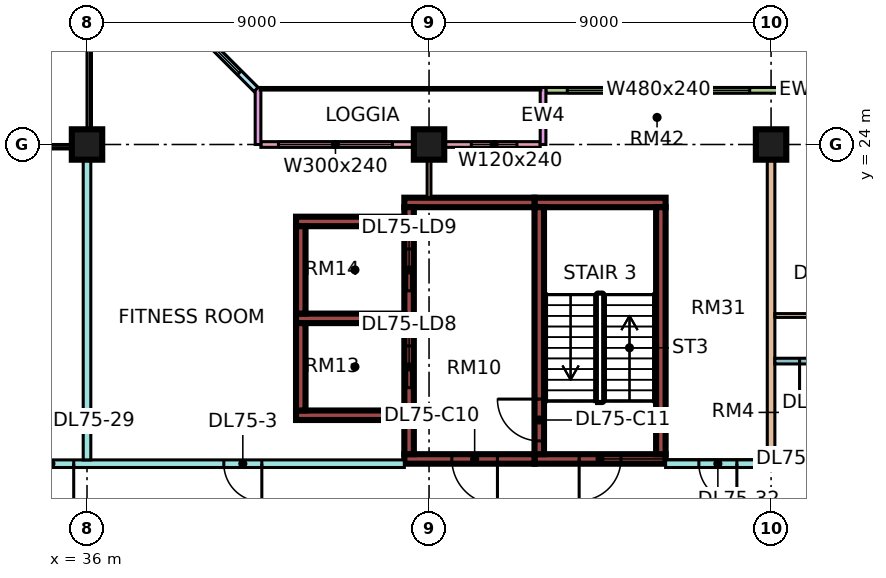
"""IFC4 building model, lengths in metres.
Left out: names, types, materials, properties, quantities, classifications, styles, units other than length and angle.
Written with IfcOpenShell. Run it as: python <this file> out.ifc"""

import sys

from ifc_helpers import new_model, si_unit, direction, frame, frame_2d, origin, origin_2d, place, context, subcontext, project, spatial, rectangle, extrude, element, fill, save


model = new_model("IFC4")
c1 = context("Model", 3, precision=1e-05, world=origin(), true_north=direction((0.0, 1.0)))
c2 = subcontext(c1, "Body", "Model", "MODEL_VIEW")
j1 = project(units=[si_unit("LENGTHUNIT", "METRE"), si_unit("PLANEANGLEUNIT", "RADIAN")], contexts=[c1])
p1 = place(None, origin())
s1 = spatial("IfcSite", under=j1, at=p1, CompositionType="ELEMENT")
p2 = place(p1, origin())
s2 = spatial("IfcBuilding", under=s1, at=p2, CompositionType="ELEMENT")
p3 = place(p2, frame((0.0, 0.0, 318.4)))
s3 = spatial("IfcBuildingStorey", under=s2, at=p3, CompositionType="ELEMENT", Elevation=318.4)
for number, where, z_axis, x_axis in (
    (1, (36.0, 24.0, 0.0), (0.0, 0.0, 1.0), (1.0, 0.0, 0.0)),
    (2, (45.0, 24.0, 0.0), (0.0, 0.0, 1.0), (1.0, 0.0, 0.0)),
    (3, (54.0, 24.0, 0.0), (0.0, 0.0, 1.0), (1.0, 0.0, 0.0)),
):
    element("IfcColumn", number, at=place(p3, frame(where, z_axis=z_axis, x_axis=x_axis)), inside=s3, PredefinedType="COLUMN", context=c2, shape_type="SweptSolid", body=[
        extrude(rectangle(XDim=0.8, YDim=0.8, at=origin_2d()), origin(), (0.0, 0.0, 1.0), 3.75),
    ])
p4 = place(p3, frame((47.775, 15.725, 0.0), z_axis=(0.0, 0.0, 1.0), x_axis=(1.0, 0.0, 0.0)))
e4 = element("IfcWall", 4, at=p4, inside=s3, PredefinedType="SHEAR", context=c2, shape_type="SweptSolid", body=[
    extrude(rectangle(XDim=3.45, YDim=0.25, at=frame_2d((1.725, 0.0))), origin(), (0.0, 0.0, 1.0), 3.75),
])
p5 = place(p4, frame((1.175, 0.0, 0.0)))
e5 = element("IfcOpeningElement", 5, at=p5, cuts=e4, PredefinedType="OPENING", context=c2, shape_type="SweptSolid", body=[
    extrude(rectangle(XDim=1.1, YDim=2.2, at=frame_2d((0.55, 1.1))), frame((0.0, 0.135, 0.0), z_axis=(0.0, -1.0, 0.0), x_axis=(1.0, 0.0, 0.0)), (0.0, 0.0, 1.0), 0.27),
])
p6 = place(p3, frame((47.775, 22.475, 0.0), z_axis=(0.0, 0.0, 1.0), x_axis=(1.0, 0.0, 0.0)))
e6 = element("IfcWall", 6, at=p6, inside=s3, PredefinedType="SHEAR", context=c2, shape_type="SweptSolid", body=[
    extrude(rectangle(XDim=3.45, YDim=0.25, at=frame_2d((1.725, 0.0))), origin(), (0.0, 0.0, 1.0), 3.75),
])
p7 = place(p3, frame((47.9, 15.85, 0.0), z_axis=(0.0, 0.0, 1.0), x_axis=(0.0, 1.0, 0.0)))
e7 = element("IfcWall", 7, at=p7, inside=s3, PredefinedType="SHEAR", context=c2, shape_type="SweptSolid", body=[
    extrude(rectangle(XDim=6.5, YDim=0.25, at=frame_2d((3.25, 0.0))), origin(), (0.0, 0.0, 1.0), 3.75),
])
p8 = place(p7, frame((0.35, 0.0, 0.0)))
e8 = element("IfcOpeningElement", 8, at=p8, cuts=e7, PredefinedType="OPENING", context=c2, shape_type="SweptSolid", body=[
    extrude(rectangle(XDim=1.1, YDim=2.2, at=frame_2d((0.55, 1.1))), frame((0.0, 0.135, 0.0), z_axis=(0.0, -1.0, 0.0), x_axis=(1.0, 0.0, 0.0)), (0.0, 0.0, 1.0), 0.27),
])
p9 = place(p3, frame((51.1, 15.85, 0.0), z_axis=(0.0, 0.0, 1.0), x_axis=(0.0, 1.0, 0.0)))
e9 = element("IfcWall", 9, at=p9, inside=s3, PredefinedType="SHEAR", context=c2, shape_type="SweptSolid", body=[
    extrude(rectangle(XDim=6.5, YDim=0.25, at=frame_2d((3.25, 0.0))), origin(), (0.0, 0.0, 1.0), 3.75),
])
p10 = place(p3, frame((44.35, 15.725, 0.0), z_axis=(0.0, 0.0, 1.0), x_axis=(1.0, 0.0, 0.0)))
e10 = element("IfcWall", 10, at=p10, inside=s3, PredefinedType="SHEAR", context=c2, shape_type="SweptSolid", body=[
    extrude(rectangle(XDim=3.425, YDim=0.25, at=frame_2d((1.712, 0.0))), origin(), (0.0, 0.0, 1.0), 3.75),
])
p11 = place(p10, frame((1.25, 0.0, 0.0)))
e11 = element("IfcOpeningElement", 11, at=p11, cuts=e10, PredefinedType="OPENING", context=c2, shape_type="SweptSolid", body=[
    extrude(rectangle(XDim=1.2, YDim=2.2, at=frame_2d((0.6, 1.1))), frame((0.0, 0.135, 0.0), z_axis=(0.0, -1.0, 0.0), x_axis=(1.0, 0.0, 0.0)), (0.0, 0.0, 1.0), 0.27),
])
p12 = place(p3, frame((44.35, 22.475, 0.0), z_axis=(0.0, 0.0, 1.0), x_axis=(1.0, 0.0, 0.0)))
e12 = element("IfcWall", 12, at=p12, inside=s3, PredefinedType="SHEAR", context=c2, shape_type="SweptSolid", body=[
    extrude(rectangle(XDim=3.425, YDim=0.25, at=frame_2d((1.712, 0.0))), origin(), (0.0, 0.0, 1.0), 3.75),
])
p13 = place(p3, frame((44.475, 15.85, 0.0), z_axis=(0.0, 0.0, 1.0), x_axis=(0.0, 1.0, 0.0)))
e13 = element("IfcWall", 13, at=p13, inside=s3, PredefinedType="SHEAR", context=c2, shape_type="SweptSolid", body=[
    extrude(rectangle(XDim=6.5, YDim=0.25, at=frame_2d((3.25, 0.0))), origin(), (0.0, 0.0, 1.0), 3.75),
])
p14 = place(p13, frame((1.75, 0.0, 0.0)))
e14 = element("IfcOpeningElement", 14, at=p14, cuts=e13, PredefinedType="OPENING", context=c2, shape_type="SweptSolid", body=[
    extrude(rectangle(XDim=1.1, YDim=2.2, at=frame_2d((0.55, 1.1))), frame((0.0, 0.135, 0.0), z_axis=(0.0, -1.0, 0.0), x_axis=(1.0, 0.0, 0.0)), (0.0, 0.0, 1.0), 0.27),
])
p15 = place(p13, frame((4.3, 0.0, 0.0)))
e15 = element("IfcOpeningElement", 15, at=p15, cuts=e13, PredefinedType="OPENING", context=c2, shape_type="SweptSolid", body=[
    extrude(rectangle(XDim=1.1, YDim=2.2, at=frame_2d((0.55, 1.1))), frame((0.0, 0.135, 0.0), z_axis=(0.0, -1.0, 0.0), x_axis=(1.0, 0.0, 0.0)), (0.0, 0.0, 1.0), 0.27),
])
for number, where, z_axis, x_axis in (
    (16, (41.5, 16.875, 0.0), (0.0, 0.0, 1.0), (1.0, 0.0, 0.0)),
    (17, (41.5, 19.425, 0.0), (0.0, 0.0, 1.0), (1.0, 0.0, 0.0)),
    (18, (41.5, 21.975, 0.0), (0.0, 0.0, 1.0), (1.0, 0.0, 0.0)),
):
    element("IfcWall", number, at=place(p3, frame(where, z_axis=z_axis, x_axis=x_axis)), inside=s3, PredefinedType="SHEAR", context=c2, shape_type="SweptSolid", body=[
        extrude(rectangle(XDim=2.85, YDim=0.25, at=frame_2d((1.425, 0.0))), origin(), (0.0, 0.0, 1.0), 3.75),
    ])
for number, where, z_axis, x_axis in (
    (19, (41.625, 17.0, 0.0), (0.0, 0.0, 1.0), (0.0, 1.0, 0.0)),
    (20, (41.625, 19.55, 0.0), (0.0, 0.0, 1.0), (0.0, 1.0, 0.0)),
):
    element("IfcWall", number, at=place(p3, frame(where, z_axis=z_axis, x_axis=x_axis)), inside=s3, PredefinedType="SHEAR", context=c2, shape_type="SweptSolid", body=[
        extrude(rectangle(XDim=2.3, YDim=0.25, at=frame_2d((1.15, 0.0))), origin(), (0.0, 0.0, 1.0), 3.75),
    ])
p16 = place(p3, frame((61.5, 25.425, 0.0), z_axis=(0.0, 0.0, 1.0), x_axis=(-1.0, 0.0, 0.0)))
e21 = element("IfcWall", 21, at=p16, inside=s3, PredefinedType="SOLIDWALL", context=c2, shape_type="SweptSolid", body=[
    extrude(rectangle(XDim=13.425, YDim=0.15, at=frame_2d((6.712, 0.0))), origin(), (0.0, 0.0, 1.0), 3.3),
])
p17 = place(p16, frame((2.1, 0.0, 0.45)))
e22 = element("IfcOpeningElement", 22, at=p17, cuts=e21, PredefinedType="OPENING", context=c2, shape_type="SweptSolid", body=[
    extrude(rectangle(XDim=1.8, YDim=2.4, at=frame_2d((0.9, 1.2))), frame((0.0, 0.085, 0.0), z_axis=(0.0, -1.0, 0.0), x_axis=(1.0, 0.0, 0.0)), (0.0, 0.0, 1.0), 0.17),
])
p18 = place(p16, frame((5.1, 0.0, 0.45)))
e23 = element("IfcOpeningElement", 23, at=p18, cuts=e21, PredefinedType="OPENING", context=c2, shape_type="SweptSolid", body=[
    extrude(rectangle(XDim=1.8, YDim=2.4, at=frame_2d((0.9, 1.2))), frame((0.0, 0.085, 0.0), z_axis=(0.0, -1.0, 0.0), x_axis=(1.0, 0.0, 0.0)), (0.0, 0.0, 1.0), 0.17),
])
p19 = place(p16, frame((8.062, 0.0, 0.45)))
e24 = element("IfcOpeningElement", 24, at=p19, cuts=e21, PredefinedType="OPENING", context=c2, shape_type="SweptSolid", body=[
    extrude(rectangle(XDim=4.8, YDim=2.4, at=frame_2d((2.4, 1.2))), frame((0.0, 0.085, 0.0), z_axis=(0.0, -1.0, 0.0), x_axis=(1.0, 0.0, 0.0)), (0.0, 0.0, 1.0), 0.17),
])
p20 = place(p3, frame((47.925, 24.0, 0.0), z_axis=(0.0, 0.0, 1.0), x_axis=(-1.0, 0.0, 0.0)))
e25 = element("IfcWall", 25, at=p20, inside=s3, PredefinedType="SOLIDWALL", context=c2, shape_type="SweptSolid", body=[
    extrude(rectangle(XDim=7.35, YDim=0.15, at=frame_2d((3.675, 0.0))), origin(), (0.0, 0.0, 1.0), 3.3),
])
p21 = place(p20, frame((0.613, 0.0, 0.45)))
e26 = element("IfcOpeningElement", 26, at=p21, cuts=e25, PredefinedType="OPENING", context=c2, shape_type="SweptSolid", body=[
    extrude(rectangle(XDim=1.2, YDim=2.4, at=frame_2d((0.6, 1.2))), frame((0.0, 0.085, 0.0), z_axis=(0.0, -1.0, 0.0), x_axis=(1.0, 0.0, 0.0)), (0.0, 0.0, 1.0), 0.17),
])
p22 = place(p20, frame((3.887, 0.0, 0.45)))
e27 = element("IfcOpeningElement", 27, at=p22, cuts=e25, PredefinedType="OPENING", context=c2, shape_type="SweptSolid", body=[
    extrude(rectangle(XDim=3.0, YDim=2.4, at=frame_2d((1.5, 1.2))), frame((0.0, 0.085, 0.0), z_axis=(0.0, -1.0, 0.0), x_axis=(1.0, 0.0, 0.0)), (0.0, 0.0, 1.0), 0.17),
])
for number, where, z_axis, x_axis in (
    (28, (48.0, 25.5, 0.0), (0.0, 0.0, 1.0), (0.0, -1.0, 0.0)),
    (29, (40.5, 25.5, 0.0), (0.0, 0.0, 1.0), (0.0, -1.0, 0.0)),
):
    element("IfcWall", number, at=place(p3, frame(where, z_axis=z_axis, x_axis=x_axis)), inside=s3, PredefinedType="SOLIDWALL", context=c2, shape_type="SweptSolid", body=[
        extrude(rectangle(XDim=1.5, YDim=0.15, at=frame_2d((0.75, 0.0))), origin(), (0.0, 0.0, 1.0), 3.3),
    ])
p23 = place(p3, frame((40.447, 25.447, 0.0), z_axis=(0.0, 0.0, 1.0), x_axis=(-0.707106781187, 0.707106781187, 0.0)))
e30 = element("IfcWall", 30, at=p23, inside=s3, PredefinedType="SOLIDWALL", context=c2, shape_type="SweptSolid", body=[
    extrude(rectangle(XDim=4.243, YDim=0.15, at=frame_2d((2.121, 0.0))), origin(), (0.0, 0.0, 1.0), 3.3),
])
p24 = place(p23, frame((0.621, 0.0, 0.45)))
e31 = element("IfcOpeningElement", 31, at=p24, cuts=e30, PredefinedType="OPENING", context=c2, shape_type="SweptSolid", body=[
    extrude(rectangle(XDim=3.0, YDim=2.4, at=frame_2d((1.5, 1.2))), frame((0.0, 0.085, 0.0), z_axis=(0.0, -1.0, 0.0), x_axis=(1.0, 0.0, 0.0)), (0.0, 0.0, 1.0), 0.17),
])
p25 = place(p3, frame((34.0, 15.6, 0.0), z_axis=(0.0, 0.0, 1.0), x_axis=(1.0, 0.0, 0.0)))
e32 = element("IfcWall", 32, at=p25, inside=s3, PredefinedType="PARTITIONING", context=c2, shape_type="SweptSolid", body=[
    extrude(rectangle(XDim=10.35, YDim=0.2, at=frame_2d((5.175, 0.0))), origin(), (0.0, 0.0, 1.0), 3.3),
])
p26 = place(p25, frame((5.6, 0.0, 0.0)))
e33 = element("IfcOpeningElement", 33, at=p26, cuts=e32, PredefinedType="OPENING", context=c2, shape_type="SweptSolid", body=[
    extrude(rectangle(XDim=1.0, YDim=2.1, at=frame_2d((0.5, 1.05))), frame((0.0, 0.11, 0.0), z_axis=(0.0, -1.0, 0.0), x_axis=(1.0, 0.0, 0.0)), (0.0, 0.0, 1.0), 0.22),
])
p27 = place(p25, frame((0.45, 0.0, 0.0)))
e34 = element("IfcOpeningElement", 34, at=p27, cuts=e32, PredefinedType="OPENING", context=c2, shape_type="SweptSolid", body=[
    extrude(rectangle(XDim=1.2, YDim=2.1, at=frame_2d((0.6, 1.05))), frame((0.0, 0.11, 0.0), z_axis=(0.0, -1.0, 0.0), x_axis=(1.0, 0.0, 0.0)), (0.0, 0.0, 1.0), 0.22),
])
p28 = place(p3, frame((36.0, 15.7, 0.0), z_axis=(0.0, 0.0, 1.0), x_axis=(0.0, 1.0, 0.0)))
e35 = element("IfcWall", 35, at=p28, inside=s3, PredefinedType="PARTITIONING", context=c2, shape_type="SweptSolid", body=[
    extrude(rectangle(XDim=8.3, YDim=0.2, at=frame_2d((4.15, 0.0))), origin(), (0.0, 0.0, 1.0), 3.3),
])
p29 = place(p3, frame((45.0, 22.6, 0.0), z_axis=(0.0, 0.0, 1.0), x_axis=(0.0, 1.0, 0.0)))
e36 = element("IfcWall", 36, at=p29, inside=s3, PredefinedType="PARTITIONING", context=c2, shape_type="SweptSolid", body=[
    extrude(rectangle(XDim=1.326, YDim=0.1, at=frame_2d((0.663, 0.0))), origin(), (0.0, 0.0, 1.0), 3.3),
])
p30 = place(p3, frame((51.225, 15.6, 0.0), z_axis=(0.0, 0.0, 1.0), x_axis=(1.0, 0.0, 0.0)))
e37 = element("IfcWall", 37, at=p30, inside=s3, PredefinedType="PARTITIONING", context=c2, shape_type="SweptSolid", body=[
    extrude(rectangle(XDim=11.701, YDim=0.2, at=frame_2d((5.851, 0.0))), origin(), (0.0, 0.0, 1.0), 3.3),
])
p31 = place(p30, frame((9.725, 0.0, 0.0)))
e38 = element("IfcOpeningElement", 38, at=p31, cuts=e37, PredefinedType="OPENING", context=c2, shape_type="SweptSolid", body=[
    extrude(rectangle(XDim=1.0, YDim=2.1, at=frame_2d((0.5, 1.05))), frame((0.0, 0.11, 0.0), z_axis=(0.0, -1.0, 0.0), x_axis=(1.0, 0.0, 0.0)), (0.0, 0.0, 1.0), 0.22),
])
p32 = place(p30, frame((0.875, 0.0, 0.0)))
e39 = element("IfcOpeningElement", 39, at=p32, cuts=e37, PredefinedType="OPENING", context=c2, shape_type="SweptSolid", body=[
    extrude(rectangle(XDim=1.0, YDim=2.1, at=frame_2d((0.5, 1.05))), frame((0.0, 0.11, 0.0), z_axis=(0.0, -1.0, 0.0), x_axis=(1.0, 0.0, 0.0)), (0.0, 0.0, 1.0), 0.22),
])
p33 = place(p3, frame((54.0, 15.7, 0.0), z_axis=(0.0, 0.0, 1.0), x_axis=(0.0, 1.0, 0.0)))
e40 = element("IfcWall", 40, at=p33, inside=s3, PredefinedType="PARTITIONING", context=c2, shape_type="SweptSolid", body=[
    extrude(rectangle(XDim=8.3, YDim=0.2, at=frame_2d((4.15, 0.0))), origin(), (0.0, 0.0, 1.0), 3.3),
])
p34 = place(p3, frame((54.1, 18.3, 0.0), z_axis=(0.0, 0.0, 1.0), x_axis=(1.0, 0.0, 0.0)))
e41 = element("IfcWall", 41, at=p34, inside=s3, PredefinedType="PARTITIONING", context=c2, shape_type="SweptSolid", body=[
    extrude(rectangle(XDim=5.975, YDim=0.15, at=frame_2d((2.987, 0.0))), origin(), (0.0, 0.0, 1.0), 3.3),
])
p35 = place(p34, frame((0.65, 0.0, 0.0)))
e42 = element("IfcOpeningElement", 42, at=p35, cuts=e41, PredefinedType="OPENING", context=c2, shape_type="SweptSolid", body=[
    extrude(rectangle(XDim=0.9, YDim=2.1, at=frame_2d((0.45, 1.05))), frame((0.0, 0.085, 0.0), z_axis=(0.0, -1.0, 0.0), x_axis=(1.0, 0.0, 0.0)), (0.0, 0.0, 1.0), 0.17),
])
p36 = place(p3, frame((54.1, 19.5, 0.0), z_axis=(0.0, 0.0, 1.0), x_axis=(1.0, 0.0, 0.0)))
e43 = element("IfcWall", 43, at=p36, inside=s3, PredefinedType="PARTITIONING", context=c2, shape_type="SweptSolid", body=[
    extrude(rectangle(XDim=5.95, YDim=0.1, at=frame_2d((2.975, 0.0))), origin(), (0.0, 0.0, 1.0), 3.3),
])
p37 = place(p36, frame((0.95, 0.0, 0.0)))
e44 = element("IfcOpeningElement", 44, at=p37, cuts=e43, PredefinedType="OPENING", context=c2, shape_type="SweptSolid", body=[
    extrude(rectangle(XDim=0.9, YDim=2.1, at=frame_2d((0.45, 1.05))), frame((0.0, 0.06, 0.0), z_axis=(0.0, -1.0, 0.0), x_axis=(1.0, 0.0, 0.0)), (0.0, 0.0, 1.0), 0.12),
])
p38 = place(p36, frame((3.95, 0.0, 0.0)))
e45 = element("IfcOpeningElement", 45, at=p38, cuts=e43, PredefinedType="OPENING", context=c2, shape_type="SweptSolid", body=[
    extrude(rectangle(XDim=0.9, YDim=2.1, at=frame_2d((0.45, 1.05))), frame((0.0, 0.06, 0.0), z_axis=(0.0, -1.0, 0.0), x_axis=(1.0, 0.0, 0.0)), (0.0, 0.0, 1.0), 0.12),
])
p39 = place(p18, origin())
e46 = element("IfcWindow", 46, at=p39, inside=s3, PartitioningType="SINGLE_PANEL", PredefinedType="WINDOW", context=c2, shape_type="SweptSolid", body=[
    extrude(rectangle(XDim=1.8, YDim=2.4, at=frame_2d((0.9, 1.2))), frame((0.0, 0.03, 0.0), z_axis=(0.0, -1.0, 0.0), x_axis=(1.0, 0.0, 0.0)), (0.0, 0.0, 1.0), 0.06),
])
fill(e23, e46)
p40 = place(p19, origin())
e47 = element("IfcWindow", 47, at=p40, inside=s3, PartitioningType="SINGLE_PANEL", PredefinedType="WINDOW", context=c2, shape_type="SweptSolid", body=[
    extrude(rectangle(XDim=4.8, YDim=2.4, at=frame_2d((2.4, 1.2))), frame((0.0, 0.03, 0.0), z_axis=(0.0, -1.0, 0.0), x_axis=(1.0, 0.0, 0.0)), (0.0, 0.0, 1.0), 0.06),
])
fill(e24, e47)
p41 = place(p21, origin())
e48 = element("IfcWindow", 48, at=p41, inside=s3, PartitioningType="SINGLE_PANEL", PredefinedType="WINDOW", context=c2, shape_type="SweptSolid", body=[
    extrude(rectangle(XDim=1.2, YDim=2.4, at=frame_2d((0.6, 1.2))), frame((0.0, 0.03, 0.0), z_axis=(0.0, -1.0, 0.0), x_axis=(1.0, 0.0, 0.0)), (0.0, 0.0, 1.0), 0.06),
])
fill(e26, e48)
p42 = place(p22, origin())
e49 = element("IfcWindow", 49, at=p42, inside=s3, PartitioningType="SINGLE_PANEL", PredefinedType="WINDOW", context=c2, shape_type="SweptSolid", body=[
    extrude(rectangle(XDim=3.0, YDim=2.4, at=frame_2d((1.5, 1.2))), frame((0.0, 0.03, 0.0), z_axis=(0.0, -1.0, 0.0), x_axis=(1.0, 0.0, 0.0)), (0.0, 0.0, 1.0), 0.06),
])
fill(e27, e49)
p43 = place(p24, origin())
e50 = element("IfcWindow", 50, at=p43, inside=s3, PartitioningType="SINGLE_PANEL", PredefinedType="WINDOW", context=c2, shape_type="SweptSolid", body=[
    extrude(rectangle(XDim=3.0, YDim=2.4, at=frame_2d((1.5, 1.2))), frame((0.0, 0.03, 0.0), z_axis=(0.0, -1.0, 0.0), x_axis=(1.0, 0.0, 0.0)), (0.0, 0.0, 1.0), 0.06),
])
fill(e31, e50)
p44 = place(p5, frame((1.1, 0.0, 0.0), z_axis=(0.0, 0.0, 1.0), x_axis=(-1.0, 0.0, 0.0)))
e51 = element("IfcDoor", 51, at=p44, inside=s3, OperationType="SINGLE_SWING_LEFT", PredefinedType="DOOR", context=c2, shape_type="SweptSolid", body=[
    extrude(rectangle(XDim=1.1, YDim=2.2, at=frame_2d((0.55, 1.1))), frame((0.0, 0.025, 0.0), z_axis=(0.0, -1.0, 0.0), x_axis=(1.0, 0.0, 0.0)), (0.0, 0.0, 1.0), 0.05),
])
fill(e5, e51)
p45 = place(p11, origin())
e52 = element("IfcDoor", 52, at=p45, inside=s3, OperationType="SINGLE_SWING_RIGHT", PredefinedType="DOOR", context=c2, shape_type="SweptSolid", body=[
    extrude(rectangle(XDim=1.2, YDim=2.2, at=frame_2d((0.6, 1.1))), frame((0.0, 0.025, 0.0), z_axis=(0.0, -1.0, 0.0), x_axis=(1.0, 0.0, 0.0)), (0.0, 0.0, 1.0), 0.05),
])
fill(e11, e52)
p46 = place(p8, frame((1.1, 0.0, 0.0), z_axis=(0.0, 0.0, 1.0), x_axis=(-1.0, 0.0, 0.0)))
e53 = element("IfcDoor", 53, at=p46, inside=s3, OperationType="SINGLE_SWING_RIGHT", PredefinedType="DOOR", context=c2, shape_type="SweptSolid", body=[
    extrude(rectangle(XDim=1.1, YDim=2.2, at=frame_2d((0.55, 1.1))), frame((0.0, 0.025, 0.0), z_axis=(0.0, -1.0, 0.0), x_axis=(1.0, 0.0, 0.0)), (0.0, 0.0, 1.0), 0.05),
])
fill(e8, e53)
p47 = place(p14, origin())
e54 = element("IfcDoor", 54, at=p47, inside=s3, OperationType="DOUBLE_DOOR_SLIDING", PredefinedType="DOOR", context=c2, shape_type="SweptSolid", body=[
    extrude(rectangle(XDim=1.1, YDim=2.2, at=frame_2d((0.55, 1.1))), frame((0.0, 0.025, 0.0), z_axis=(0.0, -1.0, 0.0), x_axis=(1.0, 0.0, 0.0)), (0.0, 0.0, 1.0), 0.05),
])
fill(e14, e54)
p48 = place(p15, origin())
e55 = element("IfcDoor", 55, at=p48, inside=s3, OperationType="DOUBLE_DOOR_SLIDING", PredefinedType="DOOR", context=c2, shape_type="SweptSolid", body=[
    extrude(rectangle(XDim=1.1, YDim=2.2, at=frame_2d((0.55, 1.1))), frame((0.0, 0.025, 0.0), z_axis=(0.0, -1.0, 0.0), x_axis=(1.0, 0.0, 0.0)), (0.0, 0.0, 1.0), 0.05),
])
fill(e15, e55)
p49 = place(p26, origin())
e56 = element("IfcDoor", 56, at=p49, inside=s3, OperationType="SINGLE_SWING_RIGHT", PredefinedType="DOOR", context=c2, shape_type="SweptSolid", body=[
    extrude(rectangle(XDim=1.0, YDim=2.1, at=frame_2d((0.5, 1.05))), frame((0.0, 0.025, 0.0), z_axis=(0.0, -1.0, 0.0), x_axis=(1.0, 0.0, 0.0)), (0.0, 0.0, 1.0), 0.05),
])
fill(e33, e56)
p50 = place(p35, frame((0.9, 0.0, 0.0), z_axis=(0.0, 0.0, 1.0), x_axis=(-1.0, 0.0, 0.0)))
e57 = element("IfcDoor", 57, at=p50, inside=s3, OperationType="SINGLE_SWING_LEFT", PredefinedType="DOOR", context=c2, shape_type="SweptSolid", body=[
    extrude(rectangle(XDim=0.9, YDim=2.1, at=frame_2d((0.45, 1.05))), frame((0.0, 0.025, 0.0), z_axis=(0.0, -1.0, 0.0), x_axis=(1.0, 0.0, 0.0)), (0.0, 0.0, 1.0), 0.05),
])
fill(e42, e57)
p51 = place(p27, origin())
e58 = element("IfcDoor", 58, at=p51, inside=s3, OperationType="SINGLE_SWING_RIGHT", PredefinedType="DOOR", context=c2, shape_type="SweptSolid", body=[
    extrude(rectangle(XDim=1.2, YDim=2.1, at=frame_2d((0.6, 1.05))), frame((0.0, 0.025, 0.0), z_axis=(0.0, -1.0, 0.0), x_axis=(1.0, 0.0, 0.0)), (0.0, 0.0, 1.0), 0.05),
])
fill(e34, e58)
p52 = place(p32, origin())
e59 = element("IfcDoor", 59, at=p52, inside=s3, OperationType="SINGLE_SWING_RIGHT", PredefinedType="DOOR", context=c2, shape_type="SweptSolid", body=[
    extrude(rectangle(XDim=1.0, YDim=2.1, at=frame_2d((0.5, 1.05))), frame((0.0, 0.025, 0.0), z_axis=(0.0, -1.0, 0.0), x_axis=(1.0, 0.0, 0.0)), (0.0, 0.0, 1.0), 0.05),
])
fill(e39, e59)
save(model, sys.argv[1])
